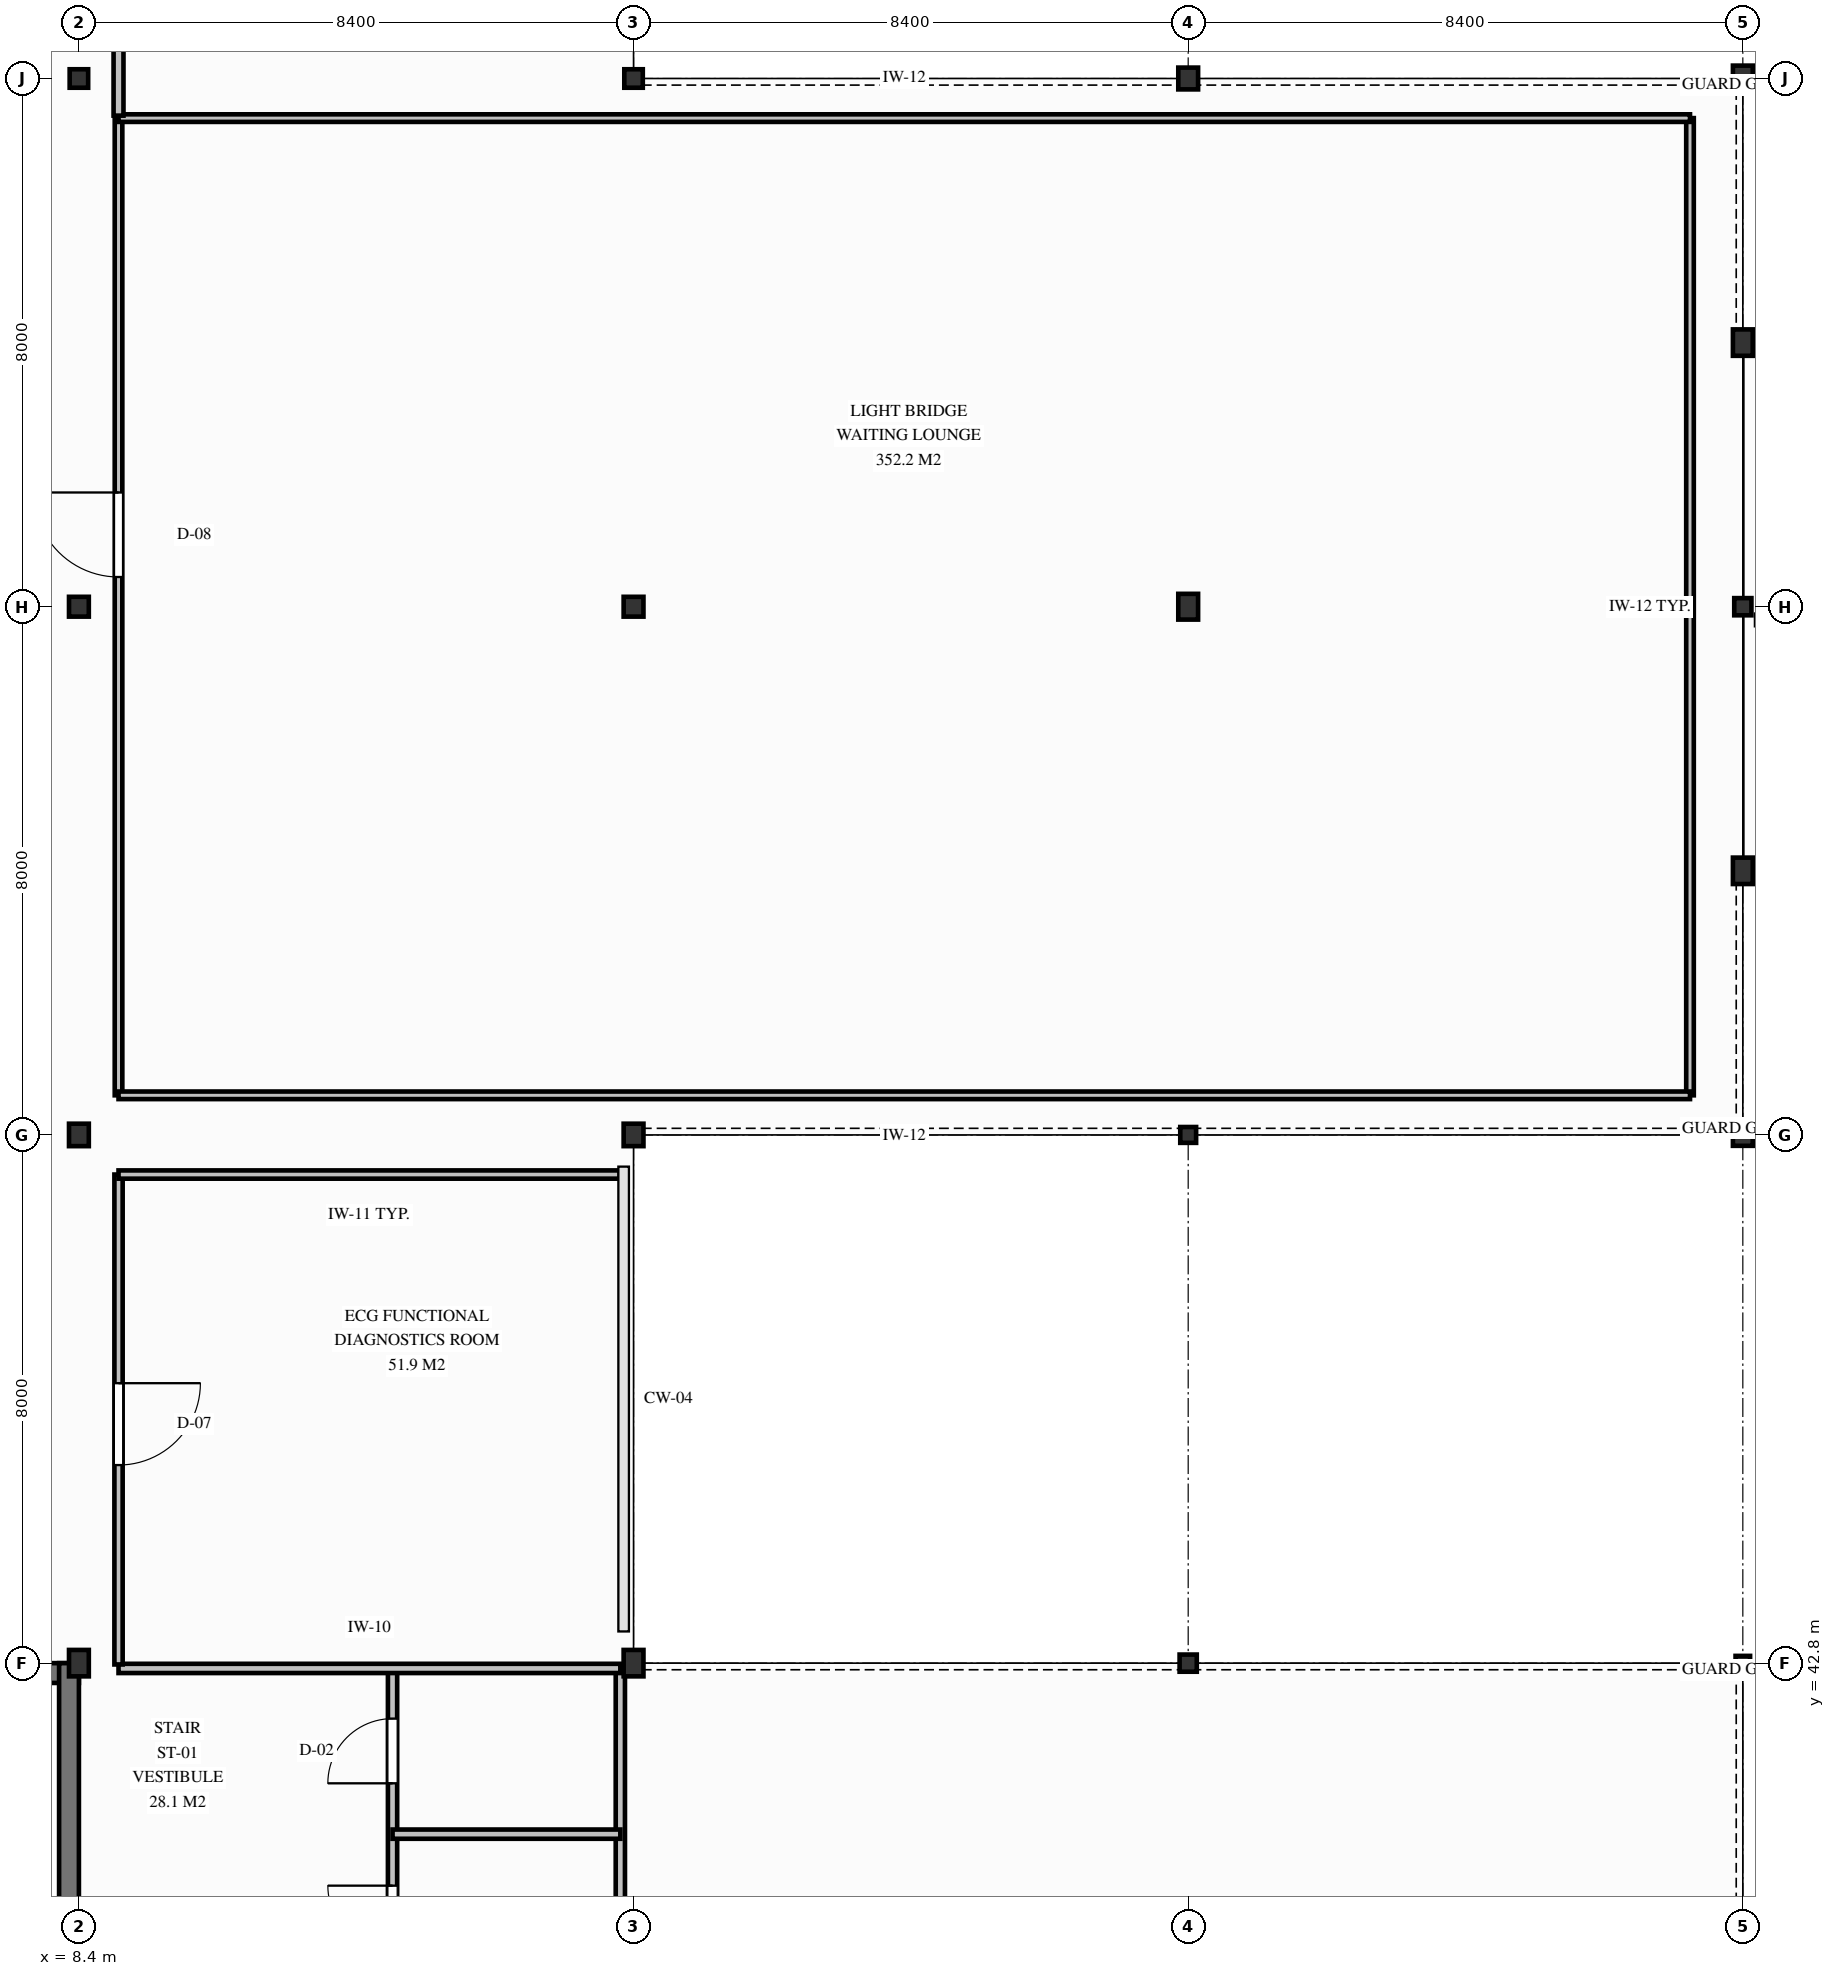
"""IFC4 building model, lengths in metres.
Left out: names, types, materials, properties, quantities, classifications, styles, units other than length and angle.
Written with IfcOpenShell. Run it as: python <this file> out.ifc"""

import sys

from ifc_helpers import new_model, si_unit, direction, frame, frame_2d, origin, origin_2d, place, context, subcontext, project, spatial, rectangle, hollow_rectangle, i_section, extrude, element, fill, save


model = new_model("IFC4")
c1 = context("Model", 3, precision=1e-05, world=origin(), true_north=direction((0.0, 1.0)))
c2 = subcontext(c1, "Body", "Model", "MODEL_VIEW")
j1 = project(units=[si_unit("LENGTHUNIT", "METRE"), si_unit("PLANEANGLEUNIT", "RADIAN")], contexts=[c1])
p1 = place(None, origin())
s1 = spatial("IfcSite", under=j1, at=p1, CompositionType="ELEMENT")
p2 = place(p1, origin())
s2 = spatial("IfcBuilding", under=s1, at=p2, CompositionType="ELEMENT")
p3 = place(p2, frame((0.0, 0.0, 4.5)))
s3 = spatial("IfcBuildingStorey", under=s2, at=p3, CompositionType="ELEMENT", Elevation=4.5)
p4 = place(p3, frame((0.0, 42.65, 0.0), z_axis=(0.0, 0.0, 1.0), x_axis=(1.0, 0.0, 0.0)))
e1 = element("IfcWall", 1, at=p4, inside=s3, PredefinedType="SHEAR", context=c2, shape_type="SweptSolid", body=[
    extrude(rectangle(XDim=8.4, YDim=0.3, at=frame_2d((4.2, 0.0))), origin(), (0.0, 0.0, 1.0), 4.5),
])
p5 = place(p3, frame((8.25, 34.8, 0.0), z_axis=(0.0, 0.0, 1.0), x_axis=(0.0, 1.0, 0.0)))
e2 = element("IfcWall", 2, at=p5, inside=s3, PredefinedType="SHEAR", context=c2, shape_type="SweptSolid", body=[
    extrude(rectangle(XDim=8.0, YDim=0.3, at=frame_2d((4.0, 0.0))), origin(), (0.0, 0.0, 1.0), 4.5),
])
p6 = place(p5, frame((2.95, 0.0, 0.0)))
e3 = element("IfcOpeningElement", 3, at=p6, cuts=e2, PredefinedType="OPENING", context=c2, shape_type="SweptSolid", body=[
    extrude(rectangle(XDim=1.1, YDim=2.15, at=frame_2d((0.55, 1.075))), frame((0.0, 0.16, 0.0), z_axis=(0.0, -1.0, 0.0), x_axis=(1.0, 0.0, 0.0)), (0.0, 0.0, 1.0), 0.32),
])
p7 = place(p5, frame((1.0, 0.0, 0.0)))
e4 = element("IfcOpeningElement", 4, at=p7, cuts=e2, PredefinedType="OPENING", context=c2, shape_type="SweptSolid", body=[
    extrude(rectangle(XDim=1.1, YDim=2.1, at=frame_2d((0.55, 1.05))), frame((0.0, 0.16, 0.0), z_axis=(0.0, -1.0, 0.0), x_axis=(1.0, 0.0, 0.0)), (0.0, 0.0, 1.0), 0.32),
])
p8 = place(p3, frame((8.4, 42.8, 0.0), z_axis=(0.0, 0.0, 1.0), x_axis=(1.0, 0.0, 0.0)))
e5 = element("IfcColumn", 5, at=p8, inside=s3, PredefinedType="COLUMN", context=c2, shape_type="SweptSolid", body=[
    extrude(i_section(OverallWidth=0.3, OverallDepth=0.4, WebThickness=0.013, FlangeThickness=0.024, FilletRadius=0.027, at=origin_2d()), origin(), (0.0, 0.0, 1.0), 4.5),
])
p9 = place(p3, frame((8.4, 50.8, 0.0), z_axis=(0.0, 0.0, 1.0), x_axis=(1.0, 0.0, 0.0)))
e6 = element("IfcColumn", 6, at=p9, inside=s3, PredefinedType="COLUMN", context=c2, shape_type="SweptSolid", body=[
    extrude(i_section(OverallWidth=0.3, OverallDepth=0.34, WebThickness=0.012, FlangeThickness=0.021, FilletRadius=0.027, at=origin_2d()), origin(), (0.0, 0.0, 1.0), 4.5),
])
p10 = place(p3, frame((8.4, 58.8, 0.0), z_axis=(0.0, 0.0, 1.0), x_axis=(1.0, 0.0, 0.0)))
e7 = element("IfcColumn", 7, at=p10, inside=s3, PredefinedType="COLUMN", context=c2, shape_type="SweptSolid", body=[
    extrude(i_section(OverallWidth=0.3, OverallDepth=0.3, WebThickness=0.011, FlangeThickness=0.019, FilletRadius=0.027, at=origin_2d()), origin(), (0.0, 0.0, 1.0), 4.5),
])
p11 = place(p3, frame((8.4, 66.8, 0.0), z_axis=(0.0, 0.0, 1.0), x_axis=(1.0, 0.0, 0.0)))
e8 = element("IfcColumn", 8, at=p11, inside=s3, PredefinedType="COLUMN", context=c2, shape_type="SweptSolid", body=[
    extrude(i_section(OverallWidth=0.28, OverallDepth=0.28, WebThickness=0.01, FlangeThickness=0.018, FilletRadius=0.024, at=origin_2d()), origin(), (0.0, 0.0, 1.0), 4.5),
])
p12 = place(p3, frame((16.8, 42.8, 0.0), z_axis=(0.0, 0.0, 1.0), x_axis=(1.0, 0.0, 0.0)))
e9 = element("IfcColumn", 9, at=p12, inside=s3, PredefinedType="COLUMN", context=c2, shape_type="SweptSolid", body=[
    extrude(i_section(OverallWidth=0.3, OverallDepth=0.4, WebThickness=0.013, FlangeThickness=0.024, FilletRadius=0.027, at=origin_2d()), origin(), (0.0, 0.0, 1.0), 4.5),
])
p13 = place(p3, frame((16.8, 50.8, 0.0), z_axis=(0.0, 0.0, 1.0), x_axis=(1.0, 0.0, 0.0)))
e10 = element("IfcColumn", 10, at=p13, inside=s3, PredefinedType="COLUMN", context=c2, shape_type="SweptSolid", body=[
    extrude(i_section(OverallWidth=0.3, OverallDepth=0.34, WebThickness=0.012, FlangeThickness=0.021, FilletRadius=0.027, at=origin_2d()), origin(), (0.0, 0.0, 1.0), 4.5),
])
p14 = place(p3, frame((16.8, 58.8, 0.0), z_axis=(0.0, 0.0, 1.0), x_axis=(1.0, 0.0, 0.0)))
e11 = element("IfcColumn", 11, at=p14, inside=s3, PredefinedType="COLUMN", context=c2, shape_type="SweptSolid", body=[
    extrude(i_section(OverallWidth=0.3, OverallDepth=0.3, WebThickness=0.011, FlangeThickness=0.019, FilletRadius=0.027, at=origin_2d()), origin(), (0.0, 0.0, 1.0), 4.5),
])
p15 = place(p3, frame((16.8, 66.8, 0.0), z_axis=(0.0, 0.0, 1.0), x_axis=(1.0, 0.0, 0.0)))
e12 = element("IfcColumn", 12, at=p15, inside=s3, PredefinedType="COLUMN", context=c2, shape_type="SweptSolid", body=[
    extrude(i_section(OverallWidth=0.28, OverallDepth=0.28, WebThickness=0.01, FlangeThickness=0.018, FilletRadius=0.024, at=origin_2d()), origin(), (0.0, 0.0, 1.0), 4.5),
])
p16 = place(p3, frame((25.2, 42.8, 0.0), z_axis=(0.0, 0.0, 1.0), x_axis=(1.0, 0.0, 0.0)))
e13 = element("IfcColumn", 13, at=p16, inside=s3, PredefinedType="COLUMN", context=c2, shape_type="SweptSolid", body=[
    extrude(i_section(OverallWidth=0.26, OverallDepth=0.26, WebThickness=0.01, FlangeThickness=0.018, FilletRadius=0.024, at=origin_2d()), origin(), (0.0, 0.0, 1.0), 4.5),
])
p17 = place(p3, frame((25.2, 50.8, 0.0), z_axis=(0.0, 0.0, 1.0), x_axis=(1.0, 0.0, 0.0)))
e14 = element("IfcColumn", 14, at=p17, inside=s3, PredefinedType="COLUMN", context=c2, shape_type="SweptSolid", body=[
    extrude(i_section(OverallWidth=0.24, OverallDepth=0.24, WebThickness=0.01, FlangeThickness=0.017, FilletRadius=0.021, at=origin_2d()), origin(), (0.0, 0.0, 1.0), 4.5),
])
p18 = place(p3, frame((25.2, 58.8, 0.0), z_axis=(0.0, 0.0, 1.0), x_axis=(1.0, 0.0, 0.0)))
e15 = element("IfcColumn", 15, at=p18, inside=s3, PredefinedType="COLUMN", context=c2, shape_type="SweptSolid", body=[
    extrude(i_section(OverallWidth=0.3, OverallDepth=0.39, WebThickness=0.011, FlangeThickness=0.019, FilletRadius=0.027, at=origin_2d()), origin(), (0.0, 0.0, 1.0), 4.5),
])
p19 = place(p3, frame((25.2, 66.8, 0.0), z_axis=(0.0, 0.0, 1.0), x_axis=(1.0, 0.0, 0.0)))
e16 = element("IfcColumn", 16, at=p19, inside=s3, PredefinedType="COLUMN", context=c2, shape_type="SweptSolid", body=[
    extrude(i_section(OverallWidth=0.3, OverallDepth=0.33, WebThickness=0.01, FlangeThickness=0.017, FilletRadius=0.027, at=origin_2d()), origin(), (0.0, 0.0, 1.0), 4.5),
])
p20 = place(p3, frame((33.6, 42.8, 0.0), z_axis=(0.0, 0.0, 1.0), x_axis=(1.0, 0.0, 0.0)))
e17 = element("IfcColumn", 17, at=p20, inside=s3, PredefinedType="COLUMN", context=c2, shape_type="SweptSolid", body=[
    extrude(hollow_rectangle(XDim=0.22, YDim=0.22, WallThickness=0.012, InnerFilletRadius=0.019, OuterFilletRadius=0.031, at=origin_2d()), origin(), (0.0, 0.0, 1.0), 4.5),
])
p21 = place(p3, frame((33.6, 50.8, 0.0), z_axis=(0.0, 0.0, 1.0), x_axis=(1.0, 0.0, 0.0)))
e18 = element("IfcColumn", 18, at=p21, inside=s3, PredefinedType="COLUMN", context=c2, shape_type="SweptSolid", body=[
    extrude(i_section(OverallWidth=0.3, OverallDepth=0.33, WebThickness=0.01, FlangeThickness=0.017, FilletRadius=0.027, at=origin_2d()), origin(), (0.0, 0.0, 1.0), 4.5),
])
p22 = place(p3, frame((33.6, 54.8, 0.0), z_axis=(0.0, 0.0, 1.0), x_axis=(1.0, 0.0, 0.0)))
e19 = element("IfcColumn", 19, at=p22, inside=s3, PredefinedType="COLUMN", context=c2, shape_type="SweptSolid", body=[
    extrude(i_section(OverallWidth=0.3, OverallDepth=0.4, WebThickness=0.013, FlangeThickness=0.024, FilletRadius=0.027, at=origin_2d()), origin(), (0.0, 0.0, 1.0), 4.5),
])
p23 = place(p3, frame((33.6, 58.8, 0.0), z_axis=(0.0, 0.0, 1.0), x_axis=(1.0, 0.0, 0.0)))
e20 = element("IfcColumn", 20, at=p23, inside=s3, PredefinedType="COLUMN", context=c2, shape_type="SweptSolid", body=[
    extrude(i_section(OverallWidth=0.26, OverallDepth=0.26, WebThickness=0.01, FlangeThickness=0.018, FilletRadius=0.024, at=origin_2d()), origin(), (0.0, 0.0, 1.0), 4.5),
])
p24 = place(p3, frame((33.6, 62.8, 0.0), z_axis=(0.0, 0.0, 1.0), x_axis=(1.0, 0.0, 0.0)))
e21 = element("IfcColumn", 21, at=p24, inside=s3, PredefinedType="COLUMN", context=c2, shape_type="SweptSolid", body=[
    extrude(i_section(OverallWidth=0.3, OverallDepth=0.4, WebThickness=0.013, FlangeThickness=0.024, FilletRadius=0.027, at=origin_2d()), origin(), (0.0, 0.0, 1.0), 4.5),
])
p25 = place(p3, frame((33.6, 66.8, 0.0), z_axis=(0.0, 0.0, 1.0), x_axis=(1.0, 0.0, 0.0)))
e22 = element("IfcColumn", 22, at=p25, inside=s3, PredefinedType="COLUMN", context=c2, shape_type="SweptSolid", body=[
    extrude(i_section(OverallWidth=0.3, OverallDepth=0.39, WebThickness=0.011, FlangeThickness=0.019, FilletRadius=0.027, at=origin_2d()), origin(), (0.0, 0.0, 1.0), 4.5),
])
p26 = place(p3, frame((13.15, 34.9, 0.0), z_axis=(0.0, 0.0, 1.0), x_axis=(0.0, 1.0, 0.0)))
e23 = element("IfcWall", 23, at=p26, inside=s3, PredefinedType="PARTITIONING", context=c2, shape_type="SweptSolid", body=[
    extrude(rectangle(XDim=7.82, YDim=0.14, at=frame_2d((3.91, 0.0))), origin(), (0.0, 0.0, 1.0), 3.978),
])
p27 = place(p26, frame((0.9, 0.0, 0.0)))
e24 = element("IfcOpeningElement", 24, at=p27, cuts=e23, PredefinedType="OPENING", context=c2, shape_type="SweptSolid", body=[
    extrude(rectangle(XDim=0.95, YDim=2.12, at=frame_2d((0.475, 1.06))), frame((0.0, 0.08, 0.0), z_axis=(0.0, -1.0, 0.0), x_axis=(1.0, 0.0, 0.0)), (0.0, 0.0, 1.0), 0.16),
])
p28 = place(p26, frame((3.55, 0.0, 0.0)))
e25 = element("IfcOpeningElement", 25, at=p28, cuts=e23, PredefinedType="OPENING", context=c2, shape_type="SweptSolid", body=[
    extrude(rectangle(XDim=0.98, YDim=2.14, at=frame_2d((0.49, 1.07))), frame((0.0, 0.08, 0.0), z_axis=(0.0, -1.0, 0.0), x_axis=(1.0, 0.0, 0.0)), (0.0, 0.0, 1.0), 0.16),
])
p29 = place(p26, frame((6.08, 0.0, 0.0)))
e26 = element("IfcOpeningElement", 26, at=p29, cuts=e23, PredefinedType="OPENING", context=c2, shape_type="SweptSolid", body=[
    extrude(rectangle(XDim=0.98, YDim=2.14, at=frame_2d((0.49, 1.07))), frame((0.0, 0.08, 0.0), z_axis=(0.0, -1.0, 0.0), x_axis=(1.0, 0.0, 0.0)), (0.0, 0.0, 1.0), 0.16),
])
p30 = place(p3, frame((16.6, 34.9, 0.0), z_axis=(0.0, 0.0, 1.0), x_axis=(0.0, 1.0, 0.0)))
e27 = element("IfcWall", 27, at=p30, inside=s3, PredefinedType="PARTITIONING", context=c2, shape_type="SweptSolid", body=[
    extrude(rectangle(XDim=7.82, YDim=0.14, at=frame_2d((3.91, 0.0))), origin(), (0.0, 0.0, 1.0), 3.628),
])
p31 = place(p3, frame((9.0, 42.72, 0.0), z_axis=(0.0, 0.0, 1.0), x_axis=(1.0, 0.0, 0.0)))
e28 = element("IfcWall", 28, at=p31, inside=s3, PredefinedType="PARTITIONING", context=c2, shape_type="SweptSolid", body=[
    extrude(rectangle(XDim=7.6, YDim=0.14, at=frame_2d((3.8, 0.0))), origin(), (0.0, 0.0, 1.0), 3.628),
])
p32 = place(p3, frame((13.15, 40.21, 0.0), z_axis=(0.0, 0.0, 1.0), x_axis=(1.0, 0.0, 0.0)))
e29 = element("IfcWall", 29, at=p32, inside=s3, PredefinedType="PARTITIONING", context=c2, shape_type="SweptSolid", body=[
    extrude(rectangle(XDim=3.45, YDim=0.14, at=frame_2d((1.725, 0.0))), origin(), (0.0, 0.0, 1.0), 3.628),
])
p33 = place(p3, frame((9.0, 50.2, 0.0), z_axis=(0.0, 0.0, 1.0), x_axis=(0.0, -1.0, 0.0)))
e30 = element("IfcWall", 30, at=p33, inside=s3, PredefinedType="PARTITIONING", context=c2, shape_type="SweptSolid", body=[
    extrude(rectangle(XDim=7.42, YDim=0.125, at=frame_2d((3.71, 0.0))), origin(), (0.0, 0.0, 1.0), 3.928),
])
p34 = place(p33, frame((3.16, 0.0, 0.0)))
e31 = element("IfcOpeningElement", 31, at=p34, cuts=e30, PredefinedType="OPENING", context=c2, shape_type="SweptSolid", body=[
    extrude(rectangle(XDim=1.24, YDim=2.2, at=frame_2d((0.62, 1.1))), frame((0.0, 0.073, 0.0), z_axis=(0.0, -1.0, 0.0), x_axis=(1.0, 0.0, 0.0)), (0.0, 0.0, 1.0), 0.145),
])
p35 = place(p3, frame((16.59, 50.2, 0.0), z_axis=(0.0, 0.0, 1.0), x_axis=(-1.0, 0.0, 0.0)))
e32 = element("IfcWall", 32, at=p35, inside=s3, PredefinedType="PARTITIONING", context=c2, shape_type="SweptSolid", body=[
    extrude(rectangle(XDim=7.59, YDim=0.125, at=frame_2d((3.795, 0.0))), origin(), (0.0, 0.0, 1.0), 3.778),
])
p36 = place(p3, frame((9.0, 51.4, 0.0), z_axis=(0.0, 0.0, 1.0), x_axis=(0.0, 1.0, 0.0)))
e33 = element("IfcWall", 33, at=p36, inside=s3, PredefinedType="PARTITIONING", context=c2, shape_type="SweptSolid", body=[
    extrude(rectangle(XDim=14.8, YDim=0.115, at=frame_2d((7.4, 0.0))), origin(), (0.0, 0.0, 1.0), 3.728),
])
p37 = place(p36, frame((7.85, 0.0, 0.0)))
e34 = element("IfcOpeningElement", 34, at=p37, cuts=e33, PredefinedType="OPENING", context=c2, shape_type="SweptSolid", body=[
    extrude(rectangle(XDim=1.28, YDim=2.22, at=frame_2d((0.64, 1.11))), frame((0.0, 0.067, 0.0), z_axis=(0.0, -1.0, 0.0), x_axis=(1.0, 0.0, 0.0)), (0.0, 0.0, 1.0), 0.135),
])
p38 = place(p3, frame((32.8, 66.2, 0.0), z_axis=(0.0, 0.0, 1.0), x_axis=(0.0, -1.0, 0.0)))
e35 = element("IfcWall", 35, at=p38, inside=s3, PredefinedType="PARTITIONING", context=c2, shape_type="SweptSolid", body=[
    extrude(rectangle(XDim=14.8, YDim=0.115, at=frame_2d((7.4, 0.0))), origin(), (0.0, 0.0, 1.0), 3.828),
])
p39 = place(p3, frame((9.0, 66.2, 0.0), z_axis=(0.0, 0.0, 1.0), x_axis=(1.0, 0.0, 0.0)))
e36 = element("IfcWall", 36, at=p39, inside=s3, PredefinedType="PARTITIONING", context=c2, shape_type="SweptSolid", body=[
    extrude(rectangle(XDim=23.8, YDim=0.115, at=frame_2d((11.9, 0.0))), origin(), (0.0, 0.0, 1.0), 3.778),
])
p40 = place(p3, frame((32.8, 51.4, 0.0), z_axis=(0.0, 0.0, 1.0), x_axis=(-1.0, 0.0, 0.0)))
e37 = element("IfcWall", 37, at=p40, inside=s3, PredefinedType="PARTITIONING", context=c2, shape_type="SweptSolid", body=[
    extrude(rectangle(XDim=23.8, YDim=0.115, at=frame_2d((11.9, 0.0))), origin(), (0.0, 0.0, 1.0), 3.628),
])
p41 = place(p3, frame((9.0, 82.7, 0.0), z_axis=(0.0, 0.0, 1.0), x_axis=(0.0, -1.0, 0.0)))
e38 = element("IfcWall", 38, at=p41, inside=s3, PredefinedType="PARTITIONING", context=c2, shape_type="SweptSolid", body=[
    extrude(rectangle(XDim=16.462, YDim=0.15, at=frame_2d((8.231, 0.0))), origin(), (0.0, 0.0, 1.0), 3.828),
])
p42 = place(p41, frame((8.4, 0.0, 0.0)))
e39 = element("IfcOpeningElement", 39, at=p42, cuts=e38, PredefinedType="OPENING", context=c2, shape_type="SweptSolid", body=[
    extrude(rectangle(XDim=1.12, YDim=2.18, at=frame_2d((0.56, 1.09))), frame((0.0, 0.085, 0.0), z_axis=(0.0, -1.0, 0.0), x_axis=(1.0, 0.0, 0.0)), (0.0, 0.0, 1.0), 0.17),
])
p43 = place(p28, origin())
e40 = element("IfcDoor", 40, at=p43, inside=s3, OperationType="SINGLE_SWING_RIGHT", PredefinedType="DOOR", context=c2, shape_type="SweptSolid", body=[
    extrude(rectangle(XDim=0.98, YDim=2.14, at=frame_2d((0.49, 1.07))), frame((0.0, 0.025, 0.0), z_axis=(0.0, -1.0, 0.0), x_axis=(1.0, 0.0, 0.0)), (0.0, 0.0, 1.0), 0.05),
])
fill(e25, e40)
p44 = place(p29, origin())
e41 = element("IfcDoor", 41, at=p44, inside=s3, OperationType="SINGLE_SWING_LEFT", PredefinedType="DOOR", context=c2, shape_type="SweptSolid", body=[
    extrude(rectangle(XDim=0.98, YDim=2.14, at=frame_2d((0.49, 1.07))), frame((0.0, 0.025, 0.0), z_axis=(0.0, -1.0, 0.0), x_axis=(1.0, 0.0, 0.0)), (0.0, 0.0, 1.0), 0.05),
])
fill(e26, e41)
p45 = place(p34, origin())
e42 = element("IfcDoor", 42, at=p45, inside=s3, OperationType="SINGLE_SWING_LEFT", PredefinedType="DOOR", context=c2, shape_type="SweptSolid", body=[
    extrude(rectangle(XDim=1.24, YDim=2.2, at=frame_2d((0.62, 1.1))), frame((0.0, 0.025, 0.0), z_axis=(0.0, -1.0, 0.0), x_axis=(1.0, 0.0, 0.0)), (0.0, 0.0, 1.0), 0.05),
])
fill(e31, e42)
p46 = place(p37, origin())
e43 = element("IfcDoor", 43, at=p46, inside=s3, OperationType="SINGLE_SWING_RIGHT", PredefinedType="DOOR", context=c2, shape_type="SweptSolid", body=[
    extrude(rectangle(XDim=1.28, YDim=2.22, at=frame_2d((0.64, 1.11))), frame((0.0, 0.025, 0.0), z_axis=(0.0, -1.0, 0.0), x_axis=(1.0, 0.0, 0.0)), (0.0, 0.0, 1.0), 0.05),
])
fill(e34, e43)
save(model, sys.argv[1])
